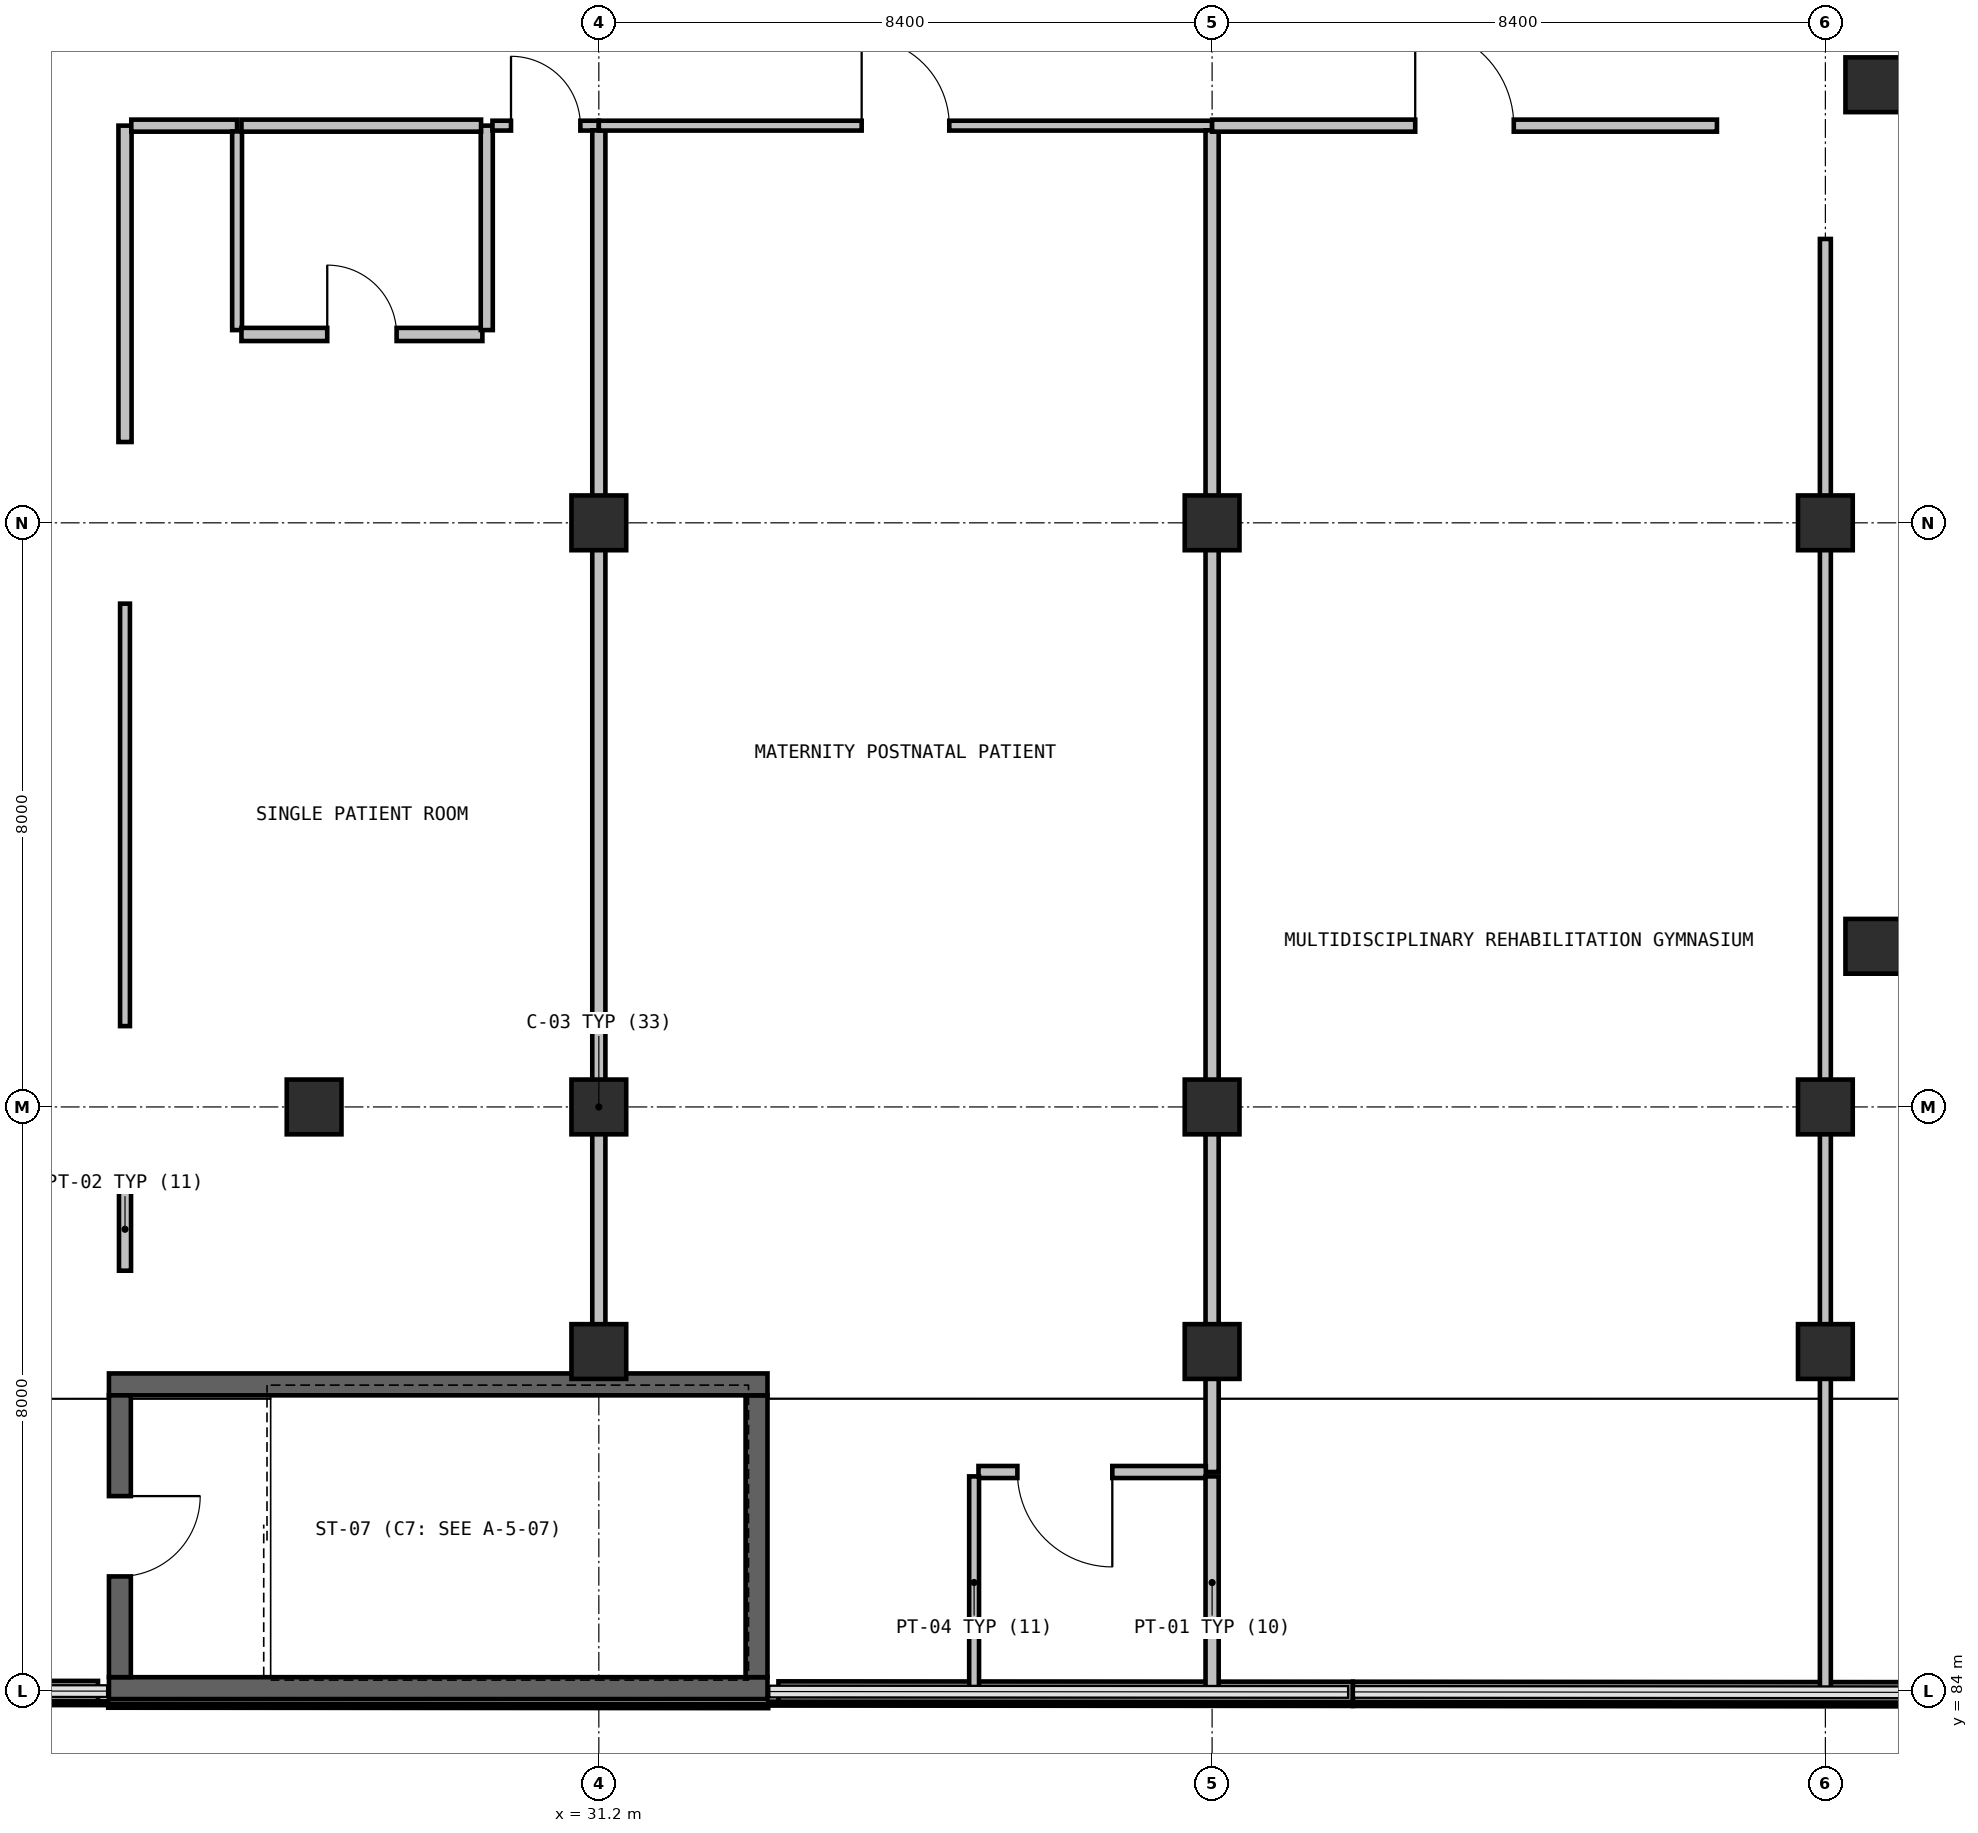
"""IFC4 building model, lengths in metres.
Left out: names, types, materials, properties, quantities, classifications, styles, units other than length and angle.
Written with IfcOpenShell. Run it as: python <this file> out.ifc"""

import sys

from ifc_helpers import new_model, si_unit, direction, frame, frame_2d, origin, origin_2d, place, context, subcontext, project, spatial, rectangle, extrude, element, fill, save


model = new_model("IFC4")
c1 = context("Model", 3, precision=1e-05, world=origin(), true_north=direction((0.0, 1.0)))
c2 = subcontext(c1, "Body", "Model", "MODEL_VIEW")
j1 = project(units=[si_unit("LENGTHUNIT", "METRE"), si_unit("PLANEANGLEUNIT", "RADIAN")], contexts=[c1])
p1 = place(None, origin())
s1 = spatial("IfcSite", under=j1, at=p1, CompositionType="ELEMENT")
p2 = place(p1, origin())
s2 = spatial("IfcBuilding", under=s1, at=p2, CompositionType="ELEMENT")
p3 = place(p2, frame((0.0, 0.0, 19.2)))
s3 = spatial("IfcBuildingStorey", under=s2, at=p3, CompositionType="ELEMENT", Elevation=19.2)
for number, where, z_axis, x_axis in (
    (1, (48.65, 94.2, 0.0), (0.0, 0.0, 1.0), (1.0, 0.0, 0.0)),
    (2, (48.65, 106.0, 0.0), (0.0, 0.0, 1.0), (1.0, 0.0, 0.0)),
    (3, (27.3, 92.0, 0.0), (0.0, 0.0, 1.0), (1.0, 0.0, 0.0)),
    (4, (31.2, 88.65, 0.0), (0.0, 0.0, 1.0), (1.0, 0.0, 0.0)),
    (5, (31.2, 92.0, 0.0), (0.0, 0.0, 1.0), (1.0, 0.0, 0.0)),
    (6, (31.2, 100.0, 0.0), (0.0, 0.0, 1.0), (1.0, 0.0, 0.0)),
    (7, (39.6, 88.65, 0.0), (0.0, 0.0, 1.0), (1.0, 0.0, 0.0)),
    (8, (39.6, 92.0, 0.0), (0.0, 0.0, 1.0), (1.0, 0.0, 0.0)),
    (9, (39.6, 100.0, 0.0), (0.0, 0.0, 1.0), (1.0, 0.0, 0.0)),
    (10, (48.0, 88.65, 0.0), (0.0, 0.0, 1.0), (1.0, 0.0, 0.0)),
    (11, (48.0, 92.0, 0.0), (0.0, 0.0, 1.0), (1.0, 0.0, 0.0)),
    (12, (48.0, 100.0, 0.0), (0.0, 0.0, 1.0), (1.0, 0.0, 0.0)),
):
    element("IfcColumn", number, at=place(p3, frame(where, z_axis=z_axis, x_axis=x_axis)), inside=s3, PredefinedType="COLUMN", context=c2, shape_type="SweptSolid", body=[
        extrude(rectangle(XDim=0.75, YDim=0.75, at=origin_2d()), origin(), (0.0, 0.0, 1.0), 4.05),
    ])
p4 = place(p3, frame((49.534, 83.982, 0.0), z_axis=(0.0, 0.0, 1.0), x_axis=(-0.999999709246, 0.000762566884, 0.0)))
e13 = element("IfcWall", 13, at=p4, inside=s3, PredefinedType="SOLIDWALL", context=c2, shape_type="SweptSolid", body=[
    extrude(rectangle(XDim=8.004, YDim=0.28, at=frame_2d((4.002, 0.0))), origin(), (0.0, 0.0, 1.0), 0.94),
])
p5 = place(p3, frame((41.526, 83.988, 0.0), z_axis=(0.0, 0.0, 1.0), x_axis=(-0.999999807334, 0.000620751611, 0.0)))
e14 = element("IfcWall", 14, at=p5, inside=s3, PredefinedType="SOLIDWALL", context=c2, shape_type="SweptSolid", body=[
    extrude(rectangle(XDim=7.866, YDim=0.28, at=frame_2d((3.933, 0.0))), origin(), (0.0, 0.0, 1.0), 0.94),
])
p6 = place(p3, frame((24.34, 83.999, 0.0), z_axis=(0.0, 0.0, 1.0), x_axis=(-0.999999756427, 0.000697958301, 0.0)))
e15 = element("IfcWall", 15, at=p6, inside=s3, PredefinedType="SOLIDWALL", context=c2, shape_type="SweptSolid", body=[
    extrude(rectangle(XDim=1.399, YDim=0.28, at=frame_2d((0.7, 0.0))), origin(), (0.0, 0.0, 1.0), 0.94),
])
p7 = place(p3, frame((24.49, 84.04, 0.0), z_axis=(0.0, 0.0, 1.0), x_axis=(1.0, 0.0, 0.0)))
e16 = element("IfcWall", 16, at=p7, inside=s3, PredefinedType="SHEAR", context=c2, shape_type="SweptSolid", body=[
    extrude(rectangle(XDim=9.02, YDim=0.3, at=frame_2d((4.51, 0.0))), origin(), (0.0, 0.0, 1.0), 3.77),
])
p8 = place(p3, frame((33.36, 84.19, 0.0), z_axis=(0.0, 0.0, 1.0), x_axis=(0.0, 1.0, 0.0)))
e17 = element("IfcWall", 17, at=p8, inside=s3, PredefinedType="SHEAR", context=c2, shape_type="SweptSolid", body=[
    extrude(rectangle(XDim=3.86, YDim=0.3, at=frame_2d((1.93, 0.0))), origin(), (0.0, 0.0, 1.0), 3.77),
])
p9 = place(p3, frame((33.51, 88.2, 0.0), z_axis=(0.0, 0.0, 1.0), x_axis=(-1.0, 0.0, 0.0)))
e18 = element("IfcWall", 18, at=p9, inside=s3, PredefinedType="SHEAR", context=c2, shape_type="SweptSolid", body=[
    extrude(rectangle(XDim=9.02, YDim=0.3, at=frame_2d((4.51, 0.0))), origin(), (0.0, 0.0, 1.0), 3.77),
])
p10 = place(p3, frame((24.64, 88.05, 0.0), z_axis=(0.0, 0.0, 1.0), x_axis=(0.0, -1.0, 0.0)))
e19 = element("IfcWall", 19, at=p10, inside=s3, PredefinedType="SHEAR", context=c2, shape_type="SweptSolid", body=[
    extrude(rectangle(XDim=3.86, YDim=0.3, at=frame_2d((1.93, 0.0))), origin(), (0.0, 0.0, 1.0), 3.77),
])
p11 = place(p10, frame((1.38, 0.0, 0.0)))
e20 = element("IfcOpeningElement", 20, at=p11, cuts=e19, PredefinedType="OPENING", context=c2, shape_type="SweptSolid", body=[
    extrude(rectangle(XDim=1.1, YDim=2.15, at=frame_2d((0.55, 1.075))), frame((0.0, 0.16, 0.0), z_axis=(0.0, -1.0, 0.0), x_axis=(1.0, 0.0, 0.0)), (0.0, 0.0, 1.0), 0.32),
])
p12 = place(p3, frame((24.71, 89.757, 0.0), z_axis=(0.0, 0.0, 1.0), x_axis=(0.0, 1.0, 0.0)))
e21 = element("IfcWall", 21, at=p12, inside=s3, PredefinedType="PARTITIONING", context=c2, shape_type="SweptSolid", body=[
    extrude(rectangle(XDim=1.136, YDim=0.165, at=frame_2d((0.568, 0.0))), origin(), (0.0, 0.0, 1.0), 3.77),
])
p13 = place(p3, frame((24.71, 93.107, 0.0), z_axis=(0.0, 0.0, 1.0), x_axis=(0.0, 1.0, 0.0)))
e22 = element("IfcWall", 22, at=p13, inside=s3, PredefinedType="PARTITIONING", context=c2, shape_type="SweptSolid", body=[
    extrude(rectangle(XDim=5.786, YDim=0.135, at=frame_2d((2.893, 0.0))), origin(), (0.0, 0.0, 1.0), 3.77),
])
p14 = place(p3, frame((24.71, 101.107, 0.0), z_axis=(0.0, 0.0, 1.0), x_axis=(0.0, 1.0, 0.0)))
e23 = element("IfcWall", 23, at=p14, inside=s3, PredefinedType="PARTITIONING", context=c2, shape_type="SweptSolid", body=[
    extrude(rectangle(XDim=4.333, YDim=0.18, at=frame_2d((2.167, 0.0))), origin(), (0.0, 0.0, 1.0), 3.77),
])
p15 = place(p3, frame((24.796, 105.44, 0.0), z_axis=(0.0, 0.0, 1.0), x_axis=(1.0, 0.0, 0.0)))
e24 = element("IfcWall", 24, at=p15, inside=s3, PredefinedType="PARTITIONING", context=c2, shape_type="SweptSolid", body=[
    extrude(rectangle(XDim=1.449, YDim=0.165, at=frame_2d((0.725, 0.0))), origin(), (0.0, 0.0, 1.0), 3.77),
])
p16 = place(p3, frame((26.245, 105.361, 0.0), z_axis=(0.0, 0.0, 1.0), x_axis=(0.0, -1.0, 0.0)))
e25 = element("IfcWall", 25, at=p16, inside=s3, PredefinedType="PARTITIONING", context=c2, shape_type="SweptSolid", body=[
    extrude(rectangle(XDim=2.721, YDim=0.135, at=frame_2d((1.361, 0.0))), origin(), (0.0, 0.0, 1.0), 3.77),
])
p17 = place(p3, frame((26.305, 102.58, 0.0), z_axis=(0.0, 0.0, 1.0), x_axis=(1.0, 0.0, 0.0)))
e26 = element("IfcWall", 26, at=p17, inside=s3, PredefinedType="PARTITIONING", context=c2, shape_type="SweptSolid", body=[
    extrude(rectangle(XDim=3.3, YDim=0.18, at=frame_2d((1.65, 0.0))), origin(), (0.0, 0.0, 1.0), 3.77),
])
p18 = place(p17, frame((1.175, 0.0, 0.0)))
e27 = element("IfcOpeningElement", 27, at=p18, cuts=e26, PredefinedType="OPENING", context=c2, shape_type="SweptSolid", body=[
    extrude(rectangle(XDim=0.95, YDim=2.1, at=frame_2d((0.475, 1.05))), frame((0.0, 0.1, 0.0), z_axis=(0.0, -1.0, 0.0), x_axis=(1.0, 0.0, 0.0)), (0.0, 0.0, 1.0), 0.2),
])
p19 = place(p3, frame((29.665, 102.64, 0.0), z_axis=(0.0, 0.0, 1.0), x_axis=(0.0, 1.0, 0.0)))
e28 = element("IfcWall", 28, at=p19, inside=s3, PredefinedType="PARTITIONING", context=c2, shape_type="SweptSolid", body=[
    extrude(rectangle(XDim=2.8, YDim=0.165, at=frame_2d((1.4, 0.0))), origin(), (0.0, 0.0, 1.0), 3.77),
])
p20 = place(p3, frame((29.743, 105.44, 0.0), z_axis=(0.0, 0.0, 1.0), x_axis=(1.0, 0.0, 0.0)))
e29 = element("IfcWall", 29, at=p20, inside=s3, PredefinedType="PARTITIONING", context=c2, shape_type="SweptSolid", body=[
    extrude(rectangle(XDim=1.457, YDim=0.135, at=frame_2d((0.729, 0.0))), origin(), (0.0, 0.0, 1.0), 3.77),
])
p21 = place(p20, frame((0.254, 0.0, 0.0)))
e30 = element("IfcOpeningElement", 30, at=p21, cuts=e29, PredefinedType="OPENING", context=c2, shape_type="SweptSolid", body=[
    extrude(rectangle(XDim=0.95, YDim=2.1, at=frame_2d((0.475, 1.05))), frame((0.0, 0.077, 0.0), z_axis=(0.0, -1.0, 0.0), x_axis=(1.0, 0.0, 0.0)), (0.0, 0.0, 1.0), 0.155),
])
p22 = place(p3, frame((31.2, 105.376, 0.0), z_axis=(0.0, 0.0, 1.0), x_axis=(0.0, -1.0, 0.0)))
e31 = element("IfcWall", 31, at=p22, inside=s3, PredefinedType="PARTITIONING", context=c2, shape_type="SweptSolid", body=[
    extrude(rectangle(XDim=17.029, YDim=0.18, at=frame_2d((8.515, 0.0))), origin(), (0.0, 0.0, 1.0), 3.12),
])
p23 = place(p3, frame((26.305, 105.44, 0.0), z_axis=(0.0, 0.0, 1.0), x_axis=(1.0, 0.0, 0.0)))
e32 = element("IfcWall", 32, at=p23, inside=s3, PredefinedType="PARTITIONING", context=c2, shape_type="SweptSolid", body=[
    extrude(rectangle(XDim=3.282, YDim=0.165, at=frame_2d((1.641, 0.0))), origin(), (0.0, 0.0, 1.0), 3.77),
])
p24 = place(p3, frame((31.2, 105.44, 0.0), z_axis=(0.0, 0.0, 1.0), x_axis=(1.0, 0.0, 0.0)))
e33 = element("IfcWall", 33, at=p24, inside=s3, PredefinedType="PARTITIONING", context=c2, shape_type="SweptSolid", body=[
    extrude(rectangle(XDim=8.4, YDim=0.135, at=frame_2d((4.2, 0.0))), origin(), (0.0, 0.0, 1.0), 3.77),
])
p25 = place(p24, frame((3.6, 0.0, 0.0)))
e34 = element("IfcOpeningElement", 34, at=p25, cuts=e33, PredefinedType="OPENING", context=c2, shape_type="SweptSolid", body=[
    extrude(rectangle(XDim=1.2, YDim=2.15, at=frame_2d((0.6, 1.075))), frame((0.0, 0.077, 0.0), z_axis=(0.0, -1.0, 0.0), x_axis=(1.0, 0.0, 0.0)), (0.0, 0.0, 1.0), 0.155),
])
p26 = place(p3, frame((39.6, 105.376, 0.0), z_axis=(0.0, 0.0, 1.0), x_axis=(0.0, -1.0, 0.0)))
e35 = element("IfcWall", 35, at=p26, inside=s3, PredefinedType="PARTITIONING", context=c2, shape_type="SweptSolid", body=[
    extrude(rectangle(XDim=18.376, YDim=0.18, at=frame_2d((9.188, 0.0))), origin(), (0.0, 0.0, 1.0), 3.12),
])
p27 = place(p3, frame((39.514, 87.0, 0.0), z_axis=(0.0, 0.0, 1.0), x_axis=(-1.0, 0.0, 0.0)))
e36 = element("IfcWall", 36, at=p27, inside=s3, PredefinedType="PARTITIONING", context=c2, shape_type="SweptSolid", body=[
    extrude(rectangle(XDim=3.114, YDim=0.165, at=frame_2d((1.557, 0.0))), origin(), (0.0, 0.0, 1.0), 3.77),
])
p28 = place(p27, frame((1.281, 0.0, 0.0)))
e37 = element("IfcOpeningElement", 37, at=p28, cuts=e36, PredefinedType="OPENING", context=c2, shape_type="SweptSolid", body=[
    extrude(rectangle(XDim=1.3, YDim=2.15, at=frame_2d((0.65, 1.075))), frame((0.0, 0.093, 0.0), z_axis=(0.0, -1.0, 0.0), x_axis=(1.0, 0.0, 0.0)), (0.0, 0.0, 1.0), 0.185),
])
p29 = place(p3, frame((36.34, 86.94, 0.0), z_axis=(0.0, 0.0, 1.0), x_axis=(0.0, -1.0, 0.0)))
e38 = element("IfcWall", 38, at=p29, inside=s3, PredefinedType="PARTITIONING", context=c2, shape_type="SweptSolid", body=[
    extrude(rectangle(XDim=2.907, YDim=0.135, at=frame_2d((1.454, 0.0))), origin(), (0.0, 0.0, 1.0), 3.77),
])
p30 = place(p3, frame((39.6, 86.94, 0.0), z_axis=(0.0, 0.0, 1.0), x_axis=(0.0, -1.0, 0.0)))
e39 = element("IfcWall", 39, at=p30, inside=s3, PredefinedType="PARTITIONING", context=c2, shape_type="SweptSolid", body=[
    extrude(rectangle(XDim=2.909, YDim=0.18, at=frame_2d((1.455, 0.0))), origin(), (0.0, 0.0, 1.0), 3.77),
])
p31 = place(p3, frame((39.6, 105.44, 0.0), z_axis=(0.0, 0.0, 1.0), x_axis=(1.0, 0.0, 0.0)))
e40 = element("IfcWall", 40, at=p31, inside=s3, PredefinedType="PARTITIONING", context=c2, shape_type="SweptSolid", body=[
    extrude(rectangle(XDim=6.915, YDim=0.165, at=frame_2d((3.458, 0.0))), origin(), (0.0, 0.0, 1.0), 3.77),
])
p32 = place(p31, frame((2.782, 0.0, 0.0)))
e41 = element("IfcOpeningElement", 41, at=p32, cuts=e40, PredefinedType="OPENING", context=c2, shape_type="SweptSolid", body=[
    extrude(rectangle(XDim=1.35, YDim=2.15, at=frame_2d((0.675, 1.075))), frame((0.0, 0.093, 0.0), z_axis=(0.0, -1.0, 0.0), x_axis=(1.0, 0.0, 0.0)), (0.0, 0.0, 1.0), 0.185),
])
p33 = place(p3, frame((48.0, 103.888, 0.0), z_axis=(0.0, 0.0, 1.0), x_axis=(0.0, -1.0, 0.0)))
e42 = element("IfcWall", 42, at=p33, inside=s3, PredefinedType="PARTITIONING", context=c2, shape_type="SweptSolid", body=[
    extrude(rectangle(XDim=19.863, YDim=0.15, at=frame_2d((9.932, 0.0))), origin(), (0.0, 0.0, 1.0), 3.12),
])
p34 = place(p11, origin())
e43 = element("IfcDoor", 43, at=p34, inside=s3, OperationType="SINGLE_SWING_LEFT", PredefinedType="DOOR", context=c2, shape_type="SweptSolid", body=[
    extrude(rectangle(XDim=1.1, YDim=2.15, at=frame_2d((0.55, 1.075))), frame((0.0, 0.025, 0.0), z_axis=(0.0, -1.0, 0.0), x_axis=(1.0, 0.0, 0.0)), (0.0, 0.0, 1.0), 0.05),
])
fill(e20, e43)
p35 = place(p21, origin())
e44 = element("IfcDoor", 44, at=p35, inside=s3, OperationType="SINGLE_SWING_RIGHT", PredefinedType="DOOR", context=c2, shape_type="SweptSolid", body=[
    extrude(rectangle(XDim=0.95, YDim=2.1, at=frame_2d((0.475, 1.05))), frame((0.0, 0.025, 0.0), z_axis=(0.0, -1.0, 0.0), x_axis=(1.0, 0.0, 0.0)), (0.0, 0.0, 1.0), 0.05),
])
fill(e30, e44)
p36 = place(p18, origin())
e45 = element("IfcDoor", 45, at=p36, inside=s3, OperationType="SINGLE_SWING_LEFT", PredefinedType="DOOR", context=c2, shape_type="SweptSolid", body=[
    extrude(rectangle(XDim=0.95, YDim=2.1, at=frame_2d((0.475, 1.05))), frame((0.0, 0.025, 0.0), z_axis=(0.0, -1.0, 0.0), x_axis=(1.0, 0.0, 0.0)), (0.0, 0.0, 1.0), 0.05),
])
fill(e27, e45)
p37 = place(p25, origin())
e46 = element("IfcDoor", 46, at=p37, inside=s3, OperationType="SINGLE_SWING_RIGHT", PredefinedType="DOOR", context=c2, shape_type="SweptSolid", body=[
    extrude(rectangle(XDim=1.2, YDim=2.15, at=frame_2d((0.6, 1.075))), frame((0.0, 0.025, 0.0), z_axis=(0.0, -1.0, 0.0), x_axis=(1.0, 0.0, 0.0)), (0.0, 0.0, 1.0), 0.05),
])
fill(e34, e46)
p38 = place(p28, origin())
e47 = element("IfcDoor", 47, at=p38, inside=s3, OperationType="SINGLE_SWING_LEFT", PredefinedType="DOOR", context=c2, shape_type="SweptSolid", body=[
    extrude(rectangle(XDim=1.3, YDim=2.15, at=frame_2d((0.65, 1.075))), frame((0.0, 0.025, 0.0), z_axis=(0.0, -1.0, 0.0), x_axis=(1.0, 0.0, 0.0)), (0.0, 0.0, 1.0), 0.05),
])
fill(e37, e47)
p39 = place(p32, origin())
e48 = element("IfcDoor", 48, at=p39, inside=s3, OperationType="SINGLE_SWING_RIGHT", PredefinedType="DOOR", context=c2, shape_type="SweptSolid", body=[
    extrude(rectangle(XDim=1.35, YDim=2.15, at=frame_2d((0.675, 1.075))), frame((0.0, 0.025, 0.0), z_axis=(0.0, -1.0, 0.0), x_axis=(1.0, 0.0, 0.0)), (0.0, 0.0, 1.0), 0.05),
])
fill(e41, e48)
save(model, sys.argv[1])
